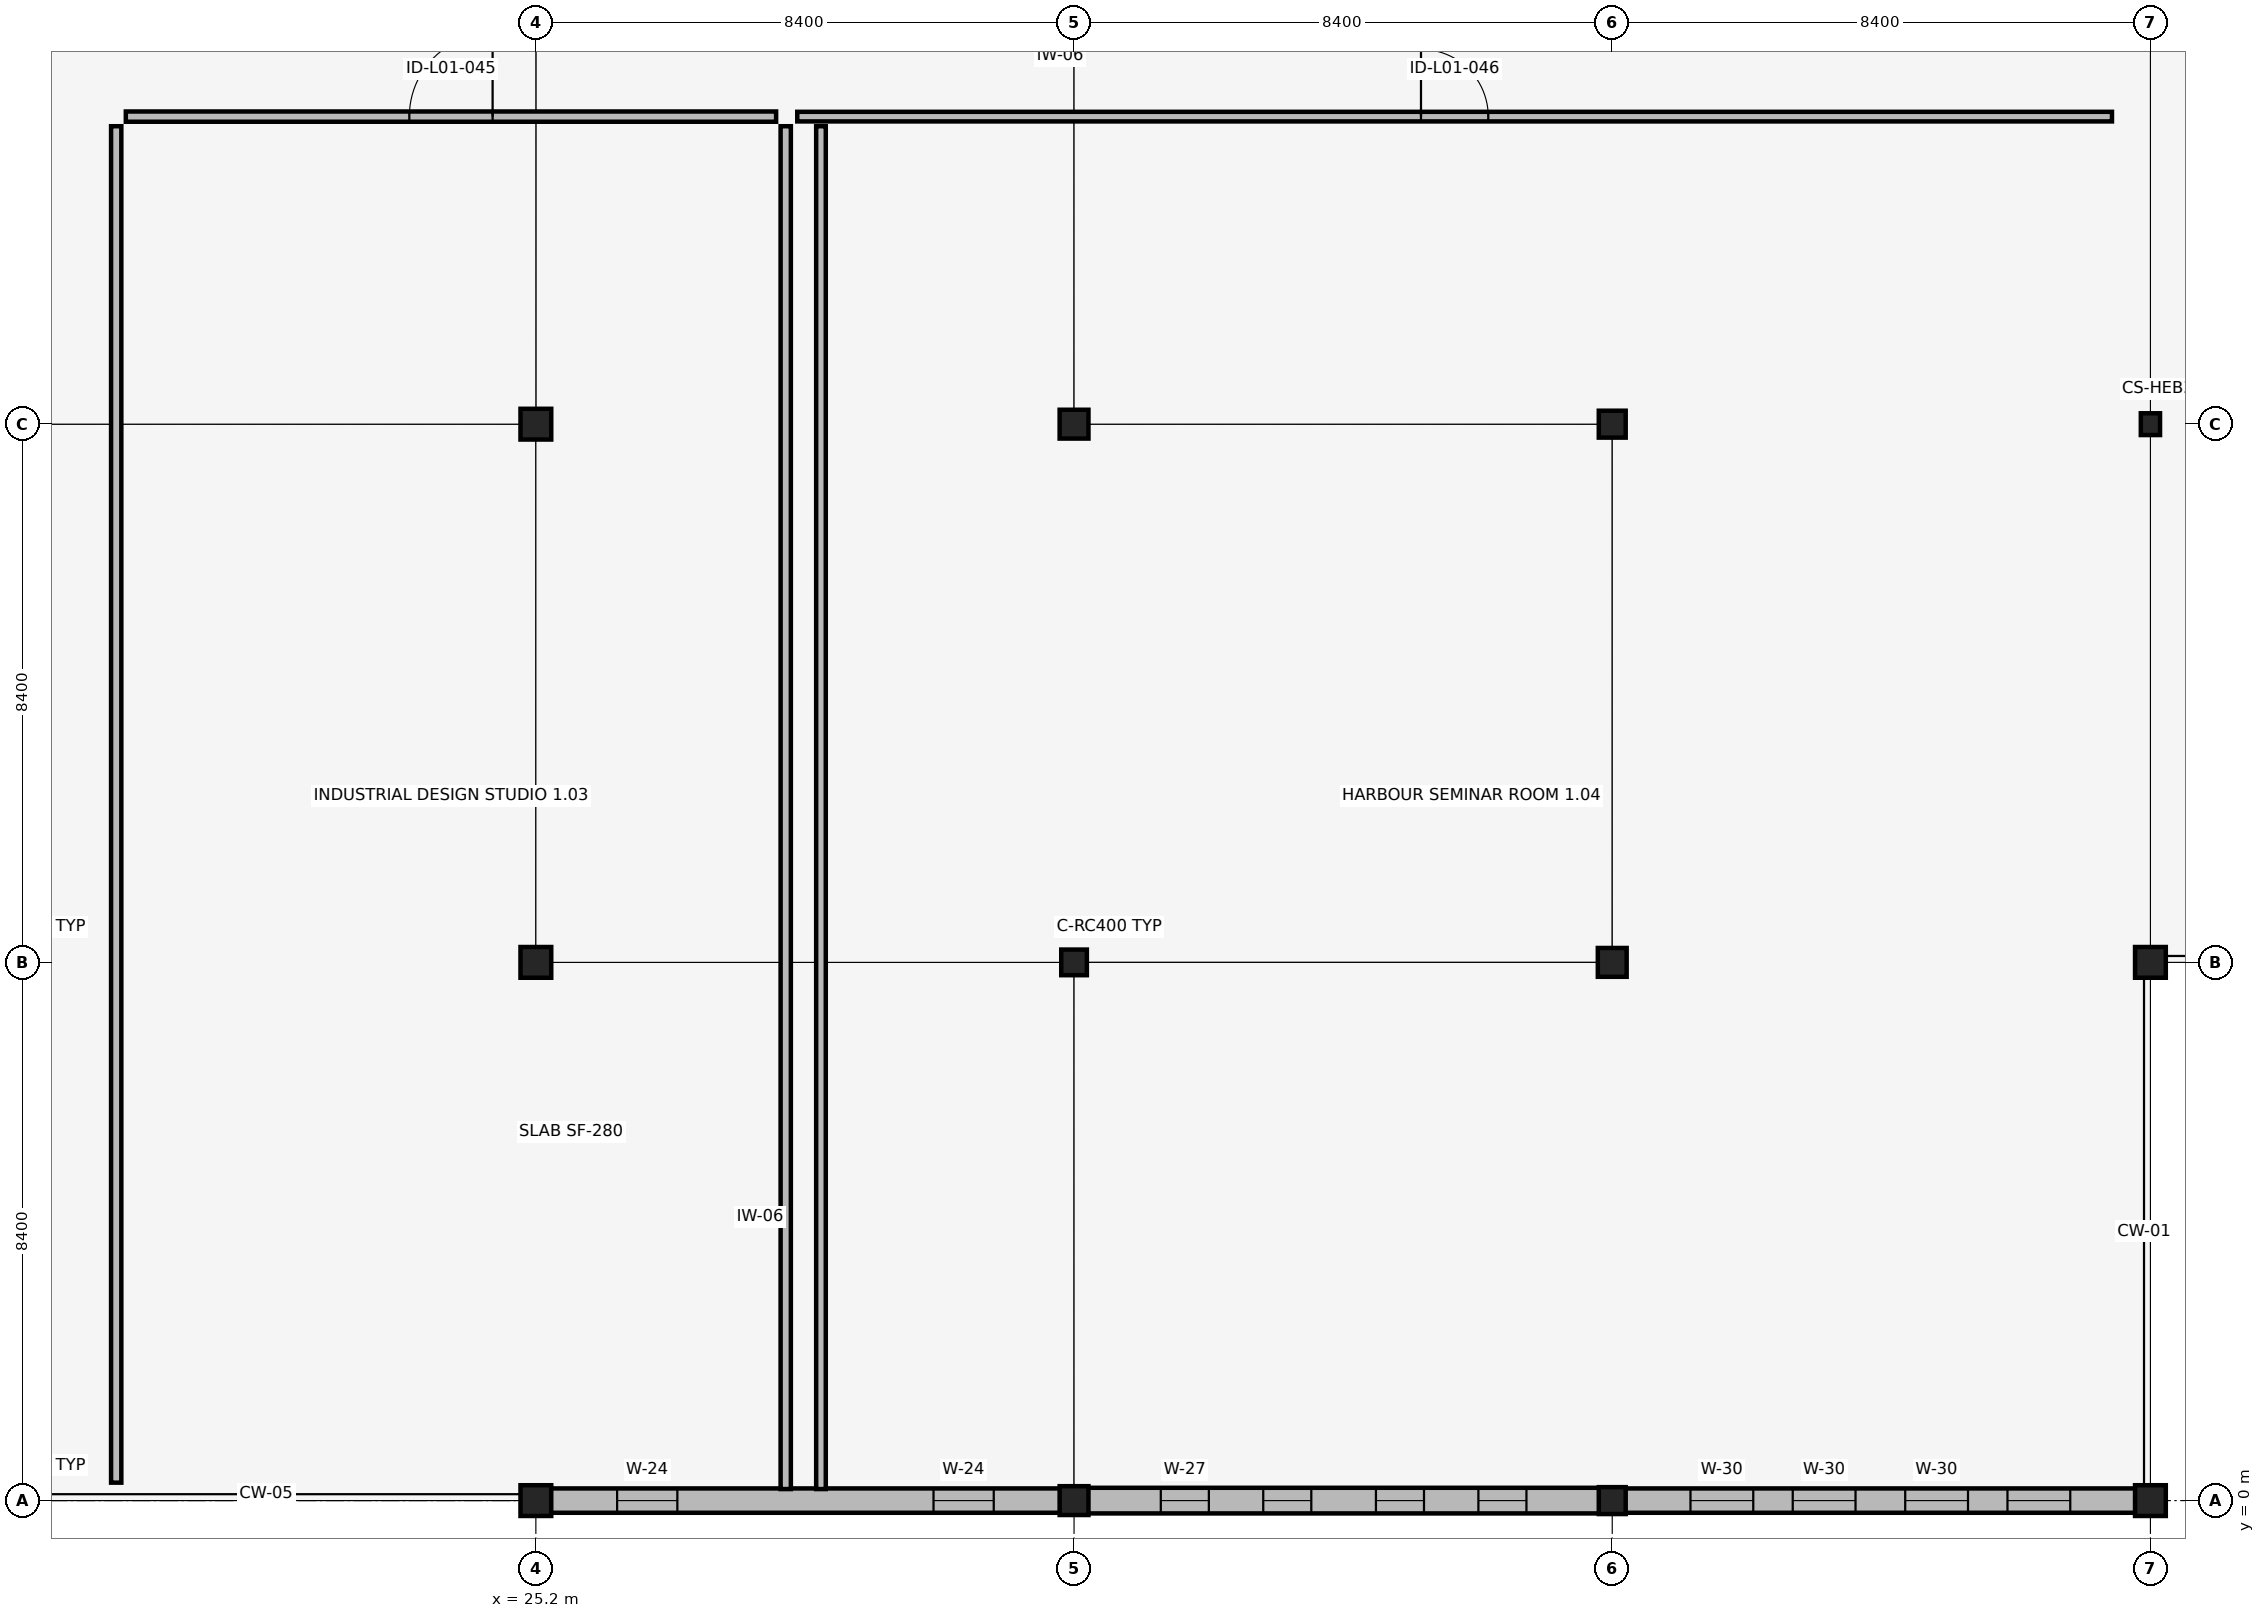
"""IFC4 building model, lengths in metres.
Left out: names, types, materials, properties, quantities, classifications, styles, units other than length and angle.
Written with IfcOpenShell. Run it as: python <this file> out.ifc"""

import sys

from ifc_helpers import new_model, si_unit, direction, frame, frame_2d, origin, origin_2d, place, context, subcontext, project, spatial, rectangle, i_section, extrude, element, fill, save


model = new_model("IFC4")
c1 = context("Model", 3, precision=1e-05, world=origin(), true_north=direction((0.0, 1.0)))
c2 = subcontext(c1, "Body", "Model", "MODEL_VIEW")
j1 = project(units=[si_unit("LENGTHUNIT", "METRE"), si_unit("PLANEANGLEUNIT", "RADIAN")], contexts=[c1])
p1 = place(None, origin())
s1 = spatial("IfcSite", under=j1, at=p1, CompositionType="ELEMENT")
p2 = place(p1, origin())
s2 = spatial("IfcBuilding", under=s1, at=p2, CompositionType="ELEMENT")
p3 = place(p2, frame((0.0, 0.0, 5.44)))
s3 = spatial("IfcBuildingStorey", under=s2, at=p3, CompositionType="ELEMENT", Elevation=5.44)
for number, where, z_axis, x_axis in (
    (1, (25.2, 0.0, 0.0), (0.0, 0.0, 1.0), (1.0, 0.0, 0.0)),
    (2, (25.2, 8.4, 0.0), (0.0, 0.0, 1.0), (1.0, 0.0, 0.0)),
    (3, (25.2, 16.8, 0.0), (0.0, 0.0, 1.0), (1.0, 0.0, 0.0)),
):
    element("IfcColumn", number, at=place(p3, frame(where, z_axis=z_axis, x_axis=x_axis)), inside=s3, PredefinedType="COLUMN", context=c2, shape_type="SweptSolid", body=[
        extrude(rectangle(XDim=0.48, YDim=0.48, at=origin_2d()), origin(), (0.0, 0.0, 1.0), 4.12),
    ])
p4 = place(p3, frame((33.6, 0.0, 0.0), z_axis=(0.0, 0.0, 1.0), x_axis=(1.0, 0.0, 0.0)))
e4 = element("IfcColumn", 4, at=p4, inside=s3, PredefinedType="COLUMN", context=c2, shape_type="SweptSolid", body=[
    extrude(rectangle(XDim=0.45, YDim=0.45, at=origin_2d()), origin(), (0.0, 0.0, 1.0), 4.12),
])
p5 = place(p3, frame((33.6, 8.4, 0.0), z_axis=(0.0, 0.0, 1.0), x_axis=(1.0, 0.0, 0.0)))
e5 = element("IfcColumn", 5, at=p5, inside=s3, PredefinedType="COLUMN", context=c2, shape_type="SweptSolid", body=[
    extrude(rectangle(XDim=0.4, YDim=0.4, at=origin_2d()), origin(), (0.0, 0.0, 1.0), 4.12),
])
p6 = place(p3, frame((33.6, 16.8, 0.0), z_axis=(0.0, 0.0, 1.0), x_axis=(1.0, 0.0, 0.0)))
e6 = element("IfcColumn", 6, at=p6, inside=s3, PredefinedType="COLUMN", context=c2, shape_type="SweptSolid", body=[
    extrude(rectangle(XDim=0.45, YDim=0.45, at=origin_2d()), origin(), (0.0, 0.0, 1.0), 4.12),
])
p7 = place(p3, frame((42.0, 0.0, 0.0), z_axis=(0.0, 0.0, 1.0), x_axis=(1.0, 0.0, 0.0)))
e7 = element("IfcColumn", 7, at=p7, inside=s3, PredefinedType="COLUMN", context=c2, shape_type="SweptSolid", body=[
    extrude(rectangle(XDim=0.42, YDim=0.42, at=origin_2d()), origin(), (0.0, 0.0, 1.0), 4.12),
])
p8 = place(p3, frame((42.0, 8.4, 0.0), z_axis=(0.0, 0.0, 1.0), x_axis=(1.0, 0.0, 0.0)))
e8 = element("IfcColumn", 8, at=p8, inside=s3, PredefinedType="COLUMN", context=c2, shape_type="SweptSolid", body=[
    extrude(rectangle(XDim=0.45, YDim=0.45, at=origin_2d()), origin(), (0.0, 0.0, 1.0), 4.12),
])
p9 = place(p3, frame((42.0, 16.8, 0.0), z_axis=(0.0, 0.0, 1.0), x_axis=(1.0, 0.0, 0.0)))
e9 = element("IfcColumn", 9, at=p9, inside=s3, PredefinedType="COLUMN", context=c2, shape_type="SweptSolid", body=[
    extrude(rectangle(XDim=0.42, YDim=0.42, at=origin_2d()), origin(), (0.0, 0.0, 1.0), 4.12),
])
for number, where, z_axis, x_axis in (
    (10, (50.4, 0.0, 0.0), (0.0, 0.0, 1.0), (1.0, 0.0, 0.0)),
    (11, (50.4, 8.4, 0.0), (0.0, 0.0, 1.0), (1.0, 0.0, 0.0)),
):
    element("IfcColumn", number, at=place(p3, frame(where, z_axis=z_axis, x_axis=x_axis)), inside=s3, PredefinedType="COLUMN", context=c2, shape_type="SweptSolid", body=[
        extrude(rectangle(XDim=0.48, YDim=0.48, at=origin_2d()), origin(), (0.0, 0.0, 1.0), 4.12),
    ])
p10 = place(p3, frame((50.4, 16.8, 0.0), z_axis=(0.0, 0.0, 1.0), x_axis=(1.0, 0.0, 0.0)))
e12 = element("IfcColumn", 12, at=p10, inside=s3, PredefinedType="COLUMN", context=c2, shape_type="SweptSolid", body=[
    extrude(i_section(OverallWidth=0.3, OverallDepth=0.34, WebThickness=0.012, FlangeThickness=0.021, FilletRadius=0.027, at=origin_2d()), origin(), (0.0, 0.0, 1.0), 4.12),
])
p11 = place(p3, frame((25.425, 0.0, 0.0), z_axis=(0.0, 0.0, 1.0), x_axis=(1.0, 0.0, 0.0)))
e13 = element("IfcWall", 13, at=p11, inside=s3, PredefinedType="SOLIDWALL", context=c2, shape_type="SweptSolid", body=[
    extrude(rectangle(XDim=7.965, YDim=0.38, at=frame_2d((3.982, 0.0))), origin(), (0.0, 0.0, 1.0), 4.12),
])
p12 = place(p11, frame((1.043, 0.0, 0.75)))
e14 = element("IfcOpeningElement", 14, at=p12, cuts=e13, PredefinedType="OPENING", context=c2, shape_type="SweptSolid", body=[
    extrude(rectangle(XDim=0.94, YDim=2.55, at=frame_2d((0.47, 1.275))), frame((0.0, 0.2, 0.0), z_axis=(0.0, -1.0, 0.0), x_axis=(1.0, 0.0, 0.0)), (0.0, 0.0, 1.0), 0.4),
])
p13 = place(p11, frame((5.982, 0.0, 0.75)))
e15 = element("IfcOpeningElement", 15, at=p13, cuts=e13, PredefinedType="OPENING", context=c2, shape_type="SweptSolid", body=[
    extrude(rectangle(XDim=0.94, YDim=2.55, at=frame_2d((0.47, 1.275))), frame((0.0, 0.2, 0.0), z_axis=(0.0, -1.0, 0.0), x_axis=(1.0, 0.0, 0.0)), (0.0, 0.0, 1.0), 0.4),
])
p14 = place(p3, frame((33.81, 0.0, 0.0), z_axis=(0.0, 0.0, 1.0), x_axis=(1.0, 0.0, 0.0)))
e16 = element("IfcWall", 16, at=p14, inside=s3, PredefinedType="SOLIDWALL", context=c2, shape_type="SweptSolid", body=[
    extrude(rectangle(XDim=7.995, YDim=0.4, at=frame_2d((3.998, 0.0))), origin(), (0.0, 0.0, 1.0), 4.12),
])
p15 = place(p14, frame((1.144, 0.0, 0.75)))
e17 = element("IfcOpeningElement", 17, at=p15, cuts=e16, PredefinedType="OPENING", context=c2, shape_type="SweptSolid", body=[
    extrude(rectangle(XDim=0.75, YDim=2.1, at=frame_2d((0.375, 1.05))), frame((0.0, 0.21, 0.0), z_axis=(0.0, -1.0, 0.0), x_axis=(1.0, 0.0, 0.0)), (0.0, 0.0, 1.0), 0.42),
])
p16 = place(p14, frame((2.743, 0.0, 0.75)))
e18 = element("IfcOpeningElement", 18, at=p16, cuts=e16, PredefinedType="OPENING", context=c2, shape_type="SweptSolid", body=[
    extrude(rectangle(XDim=0.75, YDim=2.1, at=frame_2d((0.375, 1.05))), frame((0.0, 0.21, 0.0), z_axis=(0.0, -1.0, 0.0), x_axis=(1.0, 0.0, 0.0)), (0.0, 0.0, 1.0), 0.42),
])
p17 = place(p14, frame((4.502, 0.0, 0.75)))
e19 = element("IfcOpeningElement", 19, at=p17, cuts=e16, PredefinedType="OPENING", context=c2, shape_type="SweptSolid", body=[
    extrude(rectangle(XDim=0.75, YDim=2.1, at=frame_2d((0.375, 1.05))), frame((0.0, 0.21, 0.0), z_axis=(0.0, -1.0, 0.0), x_axis=(1.0, 0.0, 0.0)), (0.0, 0.0, 1.0), 0.42),
])
p18 = place(p14, frame((6.101, 0.0, 0.75)))
e20 = element("IfcOpeningElement", 20, at=p18, cuts=e16, PredefinedType="OPENING", context=c2, shape_type="SweptSolid", body=[
    extrude(rectangle(XDim=0.75, YDim=2.1, at=frame_2d((0.375, 1.05))), frame((0.0, 0.21, 0.0), z_axis=(0.0, -1.0, 0.0), x_axis=(1.0, 0.0, 0.0)), (0.0, 0.0, 1.0), 0.42),
])
p19 = place(p3, frame((42.195, 0.0, 0.0), z_axis=(0.0, 0.0, 1.0), x_axis=(1.0, 0.0, 0.0)))
e21 = element("IfcWall", 21, at=p19, inside=s3, PredefinedType="SOLIDWALL", context=c2, shape_type="SweptSolid", body=[
    extrude(rectangle(XDim=7.98, YDim=0.38, at=frame_2d((3.99, 0.0))), origin(), (0.0, 0.0, 1.0), 4.12),
])
p20 = place(p19, frame((1.026, 0.0, 0.75)))
e22 = element("IfcOpeningElement", 22, at=p20, cuts=e21, PredefinedType="OPENING", context=c2, shape_type="SweptSolid", body=[
    extrude(rectangle(XDim=0.98, YDim=2.6, at=frame_2d((0.49, 1.3))), frame((0.0, 0.2, 0.0), z_axis=(0.0, -1.0, 0.0), x_axis=(1.0, 0.0, 0.0)), (0.0, 0.0, 1.0), 0.4),
])
p21 = place(p19, frame((2.622, 0.0, 0.75)))
e23 = element("IfcOpeningElement", 23, at=p21, cuts=e21, PredefinedType="OPENING", context=c2, shape_type="SweptSolid", body=[
    extrude(rectangle(XDim=0.98, YDim=2.6, at=frame_2d((0.49, 1.3))), frame((0.0, 0.2, 0.0), z_axis=(0.0, -1.0, 0.0), x_axis=(1.0, 0.0, 0.0)), (0.0, 0.0, 1.0), 0.4),
])
p22 = place(p19, frame((4.378, 0.0, 0.75)))
e24 = element("IfcOpeningElement", 24, at=p22, cuts=e21, PredefinedType="OPENING", context=c2, shape_type="SweptSolid", body=[
    extrude(rectangle(XDim=0.98, YDim=2.6, at=frame_2d((0.49, 1.3))), frame((0.0, 0.2, 0.0), z_axis=(0.0, -1.0, 0.0), x_axis=(1.0, 0.0, 0.0)), (0.0, 0.0, 1.0), 0.4),
])
p23 = place(p19, frame((5.974, 0.0, 0.75)))
e25 = element("IfcOpeningElement", 25, at=p23, cuts=e21, PredefinedType="OPENING", context=c2, shape_type="SweptSolid", body=[
    extrude(rectangle(XDim=0.98, YDim=2.6, at=frame_2d((0.49, 1.3))), frame((0.0, 0.2, 0.0), z_axis=(0.0, -1.0, 0.0), x_axis=(1.0, 0.0, 0.0)), (0.0, 0.0, 1.0), 0.4),
])
p24 = place(p3, frame((18.8, 21.6, 0.0), z_axis=(0.0, 0.0, 1.0), x_axis=(1.0, 0.0, 0.0)))
e26 = element("IfcWall", 26, at=p24, inside=s3, PredefinedType="PARTITIONING", context=c2, shape_type="SweptSolid", body=[
    extrude(rectangle(XDim=10.15, YDim=0.16, at=frame_2d((5.075, 0.0))), origin(), (0.0, 0.0, 1.0), 4.12),
])
p25 = place(p24, frame((4.425, 0.0, 0.0)))
e27 = element("IfcOpeningElement", 27, at=p25, cuts=e26, PredefinedType="OPENING", context=c2, shape_type="SweptSolid", body=[
    extrude(rectangle(XDim=1.3, YDim=2.2, at=frame_2d((0.65, 1.1))), frame((0.0, 0.09, 0.0), z_axis=(0.0, -1.0, 0.0), x_axis=(1.0, 0.0, 0.0)), (0.0, 0.0, 1.0), 0.18),
])
p26 = place(p3, frame((18.65, 0.28, 0.0), z_axis=(0.0, 0.0, 1.0), x_axis=(0.0, 1.0, 0.0)))
e28 = element("IfcWall", 28, at=p26, inside=s3, PredefinedType="PARTITIONING", context=c2, shape_type="SweptSolid", body=[
    extrude(rectangle(XDim=21.17, YDim=0.16, at=frame_2d((10.585, 0.0))), origin(), (0.0, 0.0, 1.0), 4.12),
])
p27 = place(p3, frame((29.1, 0.18, 0.0), z_axis=(0.0, 0.0, 1.0), x_axis=(0.0, 1.0, 0.0)))
e29 = element("IfcWall", 29, at=p27, inside=s3, PredefinedType="PARTITIONING", context=c2, shape_type="SweptSolid", body=[
    extrude(rectangle(XDim=21.27, YDim=0.16, at=frame_2d((10.635, 0.0))), origin(), (0.0, 0.0, 1.0), 4.12),
])
p28 = place(p3, frame((29.28, 21.6, 0.0), z_axis=(0.0, 0.0, 1.0), x_axis=(1.0, 0.0, 0.0)))
e30 = element("IfcWall", 30, at=p28, inside=s3, PredefinedType="PARTITIONING", context=c2, shape_type="SweptSolid", body=[
    extrude(rectangle(XDim=20.52, YDim=0.15, at=frame_2d((10.26, 0.0))), origin(), (0.0, 0.0, 1.0), 4.12),
])
p29 = place(p28, frame((9.735, 0.0, 0.0)))
e31 = element("IfcOpeningElement", 31, at=p29, cuts=e30, PredefinedType="OPENING", context=c2, shape_type="SweptSolid", body=[
    extrude(rectangle(XDim=1.05, YDim=2.15, at=frame_2d((0.525, 1.075))), frame((0.0, 0.085, 0.0), z_axis=(0.0, -1.0, 0.0), x_axis=(1.0, 0.0, 0.0)), (0.0, 0.0, 1.0), 0.17),
])
p30 = place(p3, frame((29.65, 0.18, 0.0), z_axis=(0.0, 0.0, 1.0), x_axis=(0.0, 1.0, 0.0)))
e32 = element("IfcWall", 32, at=p30, inside=s3, PredefinedType="PARTITIONING", context=c2, shape_type="SweptSolid", body=[
    extrude(rectangle(XDim=21.27, YDim=0.15, at=frame_2d((10.635, 0.0))), origin(), (0.0, 0.0, 1.0), 4.12),
])
p31 = place(p12, origin())
e33 = element("IfcWindow", 33, at=p31, inside=s3, PartitioningType="DOUBLE_PANEL_VERTICAL", PredefinedType="WINDOW", context=c2, shape_type="SweptSolid", body=[
    extrude(rectangle(XDim=0.94, YDim=2.55, at=frame_2d((0.47, 1.275))), frame((0.0, 0.03, 0.0), z_axis=(0.0, -1.0, 0.0), x_axis=(1.0, 0.0, 0.0)), (0.0, 0.0, 1.0), 0.06),
])
fill(e14, e33)
p32 = place(p13, origin())
e34 = element("IfcWindow", 34, at=p32, inside=s3, PartitioningType="DOUBLE_PANEL_VERTICAL", PredefinedType="WINDOW", context=c2, shape_type="SweptSolid", body=[
    extrude(rectangle(XDim=0.94, YDim=2.55, at=frame_2d((0.47, 1.275))), frame((0.0, 0.03, 0.0), z_axis=(0.0, -1.0, 0.0), x_axis=(1.0, 0.0, 0.0)), (0.0, 0.0, 1.0), 0.06),
])
fill(e15, e34)
p33 = place(p15, origin())
e35 = element("IfcWindow", 35, at=p33, inside=s3, PartitioningType="DOUBLE_PANEL_VERTICAL", PredefinedType="WINDOW", context=c2, shape_type="SweptSolid", body=[
    extrude(rectangle(XDim=0.75, YDim=2.1, at=frame_2d((0.375, 1.05))), frame((0.0, 0.03, 0.0), z_axis=(0.0, -1.0, 0.0), x_axis=(1.0, 0.0, 0.0)), (0.0, 0.0, 1.0), 0.06),
])
fill(e17, e35)
p34 = place(p16, origin())
e36 = element("IfcWindow", 36, at=p34, inside=s3, PartitioningType="DOUBLE_PANEL_VERTICAL", PredefinedType="WINDOW", context=c2, shape_type="SweptSolid", body=[
    extrude(rectangle(XDim=0.75, YDim=2.1, at=frame_2d((0.375, 1.05))), frame((0.0, 0.03, 0.0), z_axis=(0.0, -1.0, 0.0), x_axis=(1.0, 0.0, 0.0)), (0.0, 0.0, 1.0), 0.06),
])
fill(e18, e36)
p35 = place(p17, origin())
e37 = element("IfcWindow", 37, at=p35, inside=s3, PartitioningType="DOUBLE_PANEL_VERTICAL", PredefinedType="WINDOW", context=c2, shape_type="SweptSolid", body=[
    extrude(rectangle(XDim=0.75, YDim=2.1, at=frame_2d((0.375, 1.05))), frame((0.0, 0.03, 0.0), z_axis=(0.0, -1.0, 0.0), x_axis=(1.0, 0.0, 0.0)), (0.0, 0.0, 1.0), 0.06),
])
fill(e19, e37)
p36 = place(p18, origin())
e38 = element("IfcWindow", 38, at=p36, inside=s3, PartitioningType="DOUBLE_PANEL_VERTICAL", PredefinedType="WINDOW", context=c2, shape_type="SweptSolid", body=[
    extrude(rectangle(XDim=0.75, YDim=2.1, at=frame_2d((0.375, 1.05))), frame((0.0, 0.03, 0.0), z_axis=(0.0, -1.0, 0.0), x_axis=(1.0, 0.0, 0.0)), (0.0, 0.0, 1.0), 0.06),
])
fill(e20, e38)
p37 = place(p20, origin())
e39 = element("IfcWindow", 39, at=p37, inside=s3, PartitioningType="DOUBLE_PANEL_VERTICAL", PredefinedType="WINDOW", context=c2, shape_type="SweptSolid", body=[
    extrude(rectangle(XDim=0.98, YDim=2.6, at=frame_2d((0.49, 1.3))), frame((0.0, 0.03, 0.0), z_axis=(0.0, -1.0, 0.0), x_axis=(1.0, 0.0, 0.0)), (0.0, 0.0, 1.0), 0.06),
])
fill(e22, e39)
p38 = place(p21, origin())
e40 = element("IfcWindow", 40, at=p38, inside=s3, PartitioningType="DOUBLE_PANEL_VERTICAL", PredefinedType="WINDOW", context=c2, shape_type="SweptSolid", body=[
    extrude(rectangle(XDim=0.98, YDim=2.6, at=frame_2d((0.49, 1.3))), frame((0.0, 0.03, 0.0), z_axis=(0.0, -1.0, 0.0), x_axis=(1.0, 0.0, 0.0)), (0.0, 0.0, 1.0), 0.06),
])
fill(e23, e40)
p39 = place(p22, origin())
e41 = element("IfcWindow", 41, at=p39, inside=s3, PartitioningType="DOUBLE_PANEL_VERTICAL", PredefinedType="WINDOW", context=c2, shape_type="SweptSolid", body=[
    extrude(rectangle(XDim=0.98, YDim=2.6, at=frame_2d((0.49, 1.3))), frame((0.0, 0.03, 0.0), z_axis=(0.0, -1.0, 0.0), x_axis=(1.0, 0.0, 0.0)), (0.0, 0.0, 1.0), 0.06),
])
fill(e24, e41)
p40 = place(p23, origin())
e42 = element("IfcWindow", 42, at=p40, inside=s3, PartitioningType="DOUBLE_PANEL_VERTICAL", PredefinedType="WINDOW", context=c2, shape_type="SweptSolid", body=[
    extrude(rectangle(XDim=0.98, YDim=2.6, at=frame_2d((0.49, 1.3))), frame((0.0, 0.03, 0.0), z_axis=(0.0, -1.0, 0.0), x_axis=(1.0, 0.0, 0.0)), (0.0, 0.0, 1.0), 0.06),
])
fill(e25, e42)
p41 = place(p25, origin())
e43 = element("IfcDoor", 43, at=p41, inside=s3, OperationType="SINGLE_SWING_RIGHT", PredefinedType="DOOR", context=c2, shape_type="SweptSolid", body=[
    extrude(rectangle(XDim=1.3, YDim=2.2, at=frame_2d((0.65, 1.1))), frame((0.0, 0.025, 0.0), z_axis=(0.0, -1.0, 0.0), x_axis=(1.0, 0.0, 0.0)), (0.0, 0.0, 1.0), 0.05),
])
fill(e27, e43)
p42 = place(p29, origin())
e44 = element("IfcDoor", 44, at=p42, inside=s3, OperationType="SINGLE_SWING_LEFT", PredefinedType="DOOR", context=c2, shape_type="SweptSolid", body=[
    extrude(rectangle(XDim=1.05, YDim=2.15, at=frame_2d((0.525, 1.075))), frame((0.0, 0.025, 0.0), z_axis=(0.0, -1.0, 0.0), x_axis=(1.0, 0.0, 0.0)), (0.0, 0.0, 1.0), 0.05),
])
fill(e31, e44)
save(model, sys.argv[1])
